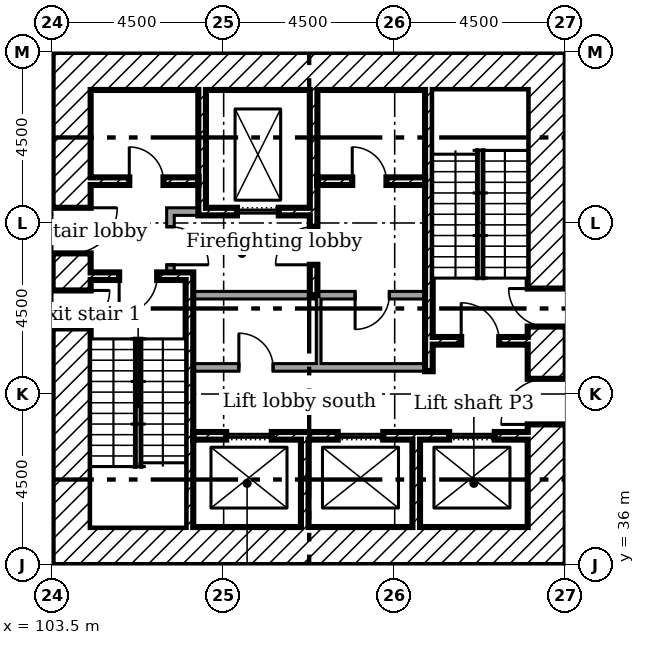
"""IFC4 building model, lengths in metres.
Left out: names, types, materials, properties, quantities, classifications, styles, units other than length and angle.
Written with IfcOpenShell. Run it as: python <this file> out.ifc"""

import sys

from ifc_helpers import new_model, si_unit, direction, frame, frame_2d, origin, place, context, subcontext, project, spatial, rectangle, extrude, element, fill, save


model = new_model("IFC4")
c1 = context("Model", 3, precision=1e-05, world=origin(), true_north=direction((0.0, 1.0)))
c2 = subcontext(c1, "Body", "Model", "MODEL_VIEW")
j1 = project(units=[si_unit("LENGTHUNIT", "METRE"), si_unit("PLANEANGLEUNIT", "RADIAN")], contexts=[c1])
p1 = place(None, origin())
s1 = spatial("IfcSite", under=j1, at=p1, CompositionType="ELEMENT")
p2 = place(p1, origin())
s2 = spatial("IfcBuilding", under=s1, at=p2, CompositionType="ELEMENT")
p3 = place(p2, frame((0.0, 0.0, 16.5)))
s3 = spatial("IfcBuildingStorey", under=s2, at=p3, CompositionType="ELEMENT", Elevation=16.5)
p4 = place(p3, frame((116.5, 36.0, 0.0), z_axis=(0.0, 0.0, 1.0), x_axis=(0.0, 1.0, 0.0)))
e1 = element("IfcWall", 1, at=p4, inside=s3, PredefinedType="SHEAR", context=c2, shape_type="SweptSolid", body=[
    extrude(rectangle(XDim=13.5, YDim=1.0, at=frame_2d((6.75, 0.0))), origin(), (0.0, 0.0, 1.0), 4.0),
])
p5 = place(p4, frame((3.7, 0.0, 0.0)))
e2 = element("IfcOpeningElement", 2, at=p5, cuts=e1, PredefinedType="OPENING", context=c2, shape_type="SweptSolid", body=[
    extrude(rectangle(XDim=1.2, YDim=2.1, at=frame_2d((0.6, 1.05))), frame((0.0, 0.51, 0.0), z_axis=(0.0, -1.0, 0.0), x_axis=(1.0, 0.0, 0.0)), (0.0, 0.0, 1.0), 1.02),
])
p6 = place(p4, frame((6.275, 0.0, 0.0)))
e3 = element("IfcOpeningElement", 3, at=p6, cuts=e1, PredefinedType="OPENING", context=c2, shape_type="SweptSolid", body=[
    extrude(rectangle(XDim=1.0, YDim=2.1, at=frame_2d((0.5, 1.05))), frame((0.0, 0.51, 0.0), z_axis=(0.0, -1.0, 0.0), x_axis=(1.0, 0.0, 0.0)), (0.0, 0.0, 1.0), 1.02),
])
for number, where in (
    (4, (104.5, 49.0, 0.0)),
    (5, (104.5, 36.5, 0.0)),
):
    element("IfcWall", number, at=place(p3, frame(where)), inside=s3, PredefinedType="SHEAR", context=c2, shape_type="SweptSolid", body=[
        extrude(rectangle(XDim=11.5, YDim=1.0, at=frame_2d((5.75, 0.0))), origin(), (0.0, 0.0, 1.0), 4.0),
    ])
p7 = place(p3, frame((104.0, 36.0, 0.0), z_axis=(0.0, 0.0, 1.0), x_axis=(0.0, 1.0, 0.0)))
e6 = element("IfcWall", 6, at=p7, inside=s3, PredefinedType="SHEAR", context=c2, shape_type="SweptSolid", body=[
    extrude(rectangle(XDim=13.5, YDim=1.0, at=frame_2d((6.75, 0.0))), origin(), (0.0, 0.0, 1.0), 4.0),
])
p8 = place(p7, frame((8.2, 0.0, 0.0)))
e7 = element("IfcOpeningElement", 7, at=p8, cuts=e6, PredefinedType="OPENING", context=c2, shape_type="SweptSolid", body=[
    extrude(rectangle(XDim=1.2, YDim=2.1, at=frame_2d((0.6, 1.05))), frame((0.0, 0.51, 0.0), z_axis=(0.0, -1.0, 0.0), x_axis=(1.0, 0.0, 0.0)), (0.0, 0.0, 1.0), 1.02),
])
p9 = place(p7, frame((6.225, 0.0, 0.0)))
e8 = element("IfcOpeningElement", 8, at=p9, cuts=e6, PredefinedType="OPENING", context=c2, shape_type="SweptSolid", body=[
    extrude(rectangle(XDim=1.0, YDim=2.1, at=frame_2d((0.5, 1.05))), frame((0.0, 0.51, 0.0), z_axis=(0.0, -1.0, 0.0), x_axis=(1.0, 0.0, 0.0)), (0.0, 0.0, 1.0), 1.02),
])
p10 = place(p3, frame((107.433, 48.5, 0.0), z_axis=(0.0, 0.0, 1.0), x_axis=(0.0, -1.0, 0.0)))
e9 = element("IfcWall", 9, at=p10, inside=s3, PredefinedType="SHEAR", context=c2, shape_type="SweptSolid", body=[
    extrude(rectangle(XDim=3.3, YDim=0.2, at=frame_2d((1.65, 0.0))), origin(), (0.0, 0.0, 1.0), 4.0),
])
p11 = place(p3, frame((110.367, 48.5, 0.0), z_axis=(0.0, 0.0, 1.0), x_axis=(0.0, -1.0, 0.0)))
e10 = element("IfcWall", 10, at=p11, inside=s3, PredefinedType="SHEAR", context=c2, shape_type="SweptSolid", body=[
    extrude(rectangle(XDim=5.4, YDim=0.2, at=frame_2d((2.7, 0.0))), origin(), (0.0, 0.0, 1.0), 4.0),
])
p12 = place(p11, frame((3.6, 0.0, 0.0)))
e11 = element("IfcOpeningElement", 11, at=p12, cuts=e10, PredefinedType="OPENING", context=c2, shape_type="SweptSolid", body=[
    extrude(rectangle(XDim=1.0, YDim=2.1, at=frame_2d((0.5, 1.05))), frame((0.0, 0.11, 0.0), z_axis=(0.0, -1.0, 0.0), x_axis=(1.0, 0.0, 0.0)), (0.0, 0.0, 1.0), 0.22),
])
for number, where, z_axis, x_axis in (
    (12, (110.133, 37.0, 0.0), (0.0, 0.0, 1.0), (0.0, 1.0, 0.0)),
    (13, (113.067, 37.0, 0.0), (0.0, 0.0, 1.0), (0.0, 1.0, 0.0)),
):
    element("IfcWall", number, at=place(p3, frame(where, z_axis=z_axis, x_axis=x_axis)), inside=s3, PredefinedType="SHEAR", context=c2, shape_type="SweptSolid", body=[
        extrude(rectangle(XDim=2.3, YDim=0.2, at=frame_2d((1.15, 0.0))), origin(), (0.0, 0.0, 1.0), 4.0),
    ])
p13 = place(p3, frame((106.5, 45.3, 0.0)))
e14 = element("IfcWall", 14, at=p13, inside=s3, PredefinedType="PARTITIONING", context=c2, shape_type="SweptSolid", body=[
    extrude(rectangle(XDim=0.833, YDim=0.2, at=frame_2d((0.417, 0.0))), origin(), (0.0, 0.0, 1.0), 4.0),
])
p14 = place(p3, frame((106.6, 43.7, 0.0), z_axis=(0.0, 0.0, 1.0), x_axis=(0.0, 1.0, 0.0)))
e15 = element("IfcWall", 15, at=p14, inside=s3, PredefinedType="PARTITIONING", context=c2, shape_type="SweptSolid", body=[
    extrude(rectangle(XDim=1.5, YDim=0.2, at=frame_2d((0.75, 0.0))), origin(), (0.0, 0.0, 1.0), 4.0),
])
p15 = place(p14, frame((0.2, 0.0, 0.0)))
e16 = element("IfcOpeningElement", 16, at=p15, cuts=e15, PredefinedType="OPENING", context=c2, shape_type="SweptSolid", body=[
    extrude(rectangle(XDim=1.0, YDim=2.1, at=frame_2d((0.5, 1.05))), frame((0.0, 0.11, 0.0), z_axis=(0.0, -1.0, 0.0), x_axis=(1.0, 0.0, 0.0)), (0.0, 0.0, 1.0), 0.22),
])
p16 = place(p3, frame((104.5, 46.1, 0.0)))
e17 = element("IfcWall", 17, at=p16, inside=s3, PredefinedType="SHEAR", context=c2, shape_type="SweptSolid", body=[
    extrude(rectangle(XDim=2.833, YDim=0.2, at=frame_2d((1.417, 0.0))), origin(), (0.0, 0.0, 1.0), 4.0),
])
p17 = place(p16, frame((1.017, 0.0, 0.0)))
e18 = element("IfcOpeningElement", 18, at=p17, cuts=e17, PredefinedType="OPENING", context=c2, shape_type="SweptSolid", body=[
    extrude(rectangle(XDim=0.9, YDim=2.1, at=frame_2d((0.45, 1.05))), frame((0.0, 0.11, 0.0), z_axis=(0.0, -1.0, 0.0), x_axis=(1.0, 0.0, 0.0)), (0.0, 0.0, 1.0), 0.22),
])
p18 = place(p3, frame((110.467, 46.1, 0.0)))
e19 = element("IfcWall", 19, at=p18, inside=s3, PredefinedType="SHEAR", context=c2, shape_type="SweptSolid", body=[
    extrude(rectangle(XDim=2.833, YDim=0.2, at=frame_2d((1.417, 0.0))), origin(), (0.0, 0.0, 1.0), 4.0),
])
p19 = place(p18, frame((0.917, 0.0, 0.0)))
e20 = element("IfcOpeningElement", 20, at=p19, cuts=e19, PredefinedType="OPENING", context=c2, shape_type="SweptSolid", body=[
    extrude(rectangle(XDim=0.9, YDim=2.1, at=frame_2d((0.45, 1.05))), frame((0.0, 0.11, 0.0), z_axis=(0.0, -1.0, 0.0), x_axis=(1.0, 0.0, 0.0)), (0.0, 0.0, 1.0), 0.22),
])
p20 = place(p3, frame((107.533, 45.3, 0.0)))
e21 = element("IfcWall", 21, at=p20, inside=s3, PredefinedType="SHEAR", context=c2, shape_type="SweptSolid", body=[
    extrude(rectangle(XDim=2.733, YDim=0.2, at=frame_2d((1.367, 0.0))), origin(), (0.0, 0.0, 1.0), 4.0),
])
p21 = place(p20, frame((0.817, 0.0, 0.0)))
e22 = element("IfcOpeningElement", 22, at=p21, cuts=e21, PredefinedType="OPENING", context=c2, shape_type="SweptSolid", body=[
    extrude(rectangle(XDim=1.1, YDim=2.1, at=frame_2d((0.55, 1.05))), frame((0.0, 0.11, 0.0), z_axis=(0.0, -1.0, 0.0), x_axis=(1.0, 0.0, 0.0)), (0.0, 0.0, 1.0), 0.22),
])
p22 = place(p3, frame((107.2, 39.4, 0.0)))
e23 = element("IfcWall", 23, at=p22, inside=s3, PredefinedType="SHEAR", context=c2, shape_type="SweptSolid", body=[
    extrude(rectangle(XDim=8.8, YDim=0.2, at=frame_2d((4.4, 0.0))), origin(), (0.0, 0.0, 1.0), 4.0),
])
p23 = place(p22, frame((0.867, 0.0, 0.0)))
e24 = element("IfcOpeningElement", 24, at=p23, cuts=e23, PredefinedType="OPENING", context=c2, shape_type="SweptSolid", body=[
    extrude(rectangle(XDim=1.2, YDim=2.1, at=frame_2d((0.6, 1.05))), frame((0.0, 0.11, 0.0), z_axis=(0.0, -1.0, 0.0), x_axis=(1.0, 0.0, 0.0)), (0.0, 0.0, 1.0), 0.22),
])
p24 = place(p22, frame((3.8, 0.0, 0.0)))
e25 = element("IfcOpeningElement", 25, at=p24, cuts=e23, PredefinedType="OPENING", context=c2, shape_type="SweptSolid", body=[
    extrude(rectangle(XDim=1.2, YDim=2.1, at=frame_2d((0.6, 1.05))), frame((0.0, 0.11, 0.0), z_axis=(0.0, -1.0, 0.0), x_axis=(1.0, 0.0, 0.0)), (0.0, 0.0, 1.0), 0.22),
])
p25 = place(p22, frame((6.733, 0.0, 0.0)))
e26 = element("IfcOpeningElement", 26, at=p25, cuts=e23, PredefinedType="OPENING", context=c2, shape_type="SweptSolid", body=[
    extrude(rectangle(XDim=1.2, YDim=2.1, at=frame_2d((0.6, 1.05))), frame((0.0, 0.11, 0.0), z_axis=(0.0, -1.0, 0.0), x_axis=(1.0, 0.0, 0.0)), (0.0, 0.0, 1.0), 0.22),
])
p26 = place(p3, frame((107.1, 37.0, 0.0), z_axis=(0.0, 0.0, 1.0), x_axis=(0.0, 1.0, 0.0)))
e27 = element("IfcWall", 27, at=p26, inside=s3, PredefinedType="SHEAR", context=c2, shape_type="SweptSolid", body=[
    extrude(rectangle(XDim=6.7, YDim=0.2, at=frame_2d((3.35, 0.0))), origin(), (0.0, 0.0, 1.0), 4.0),
])
p27 = place(p3, frame((104.5, 43.6, 0.0)))
e28 = element("IfcWall", 28, at=p27, inside=s3, PredefinedType="SHEAR", context=c2, shape_type="SweptSolid", body=[
    extrude(rectangle(XDim=2.5, YDim=0.2, at=frame_2d((1.25, 0.0))), origin(), (0.0, 0.0, 1.0), 4.0),
])
p28 = place(p27, frame((0.75, 0.0, 0.0)))
e29 = element("IfcOpeningElement", 29, at=p28, cuts=e28, PredefinedType="OPENING", context=c2, shape_type="SweptSolid", body=[
    extrude(rectangle(XDim=1.0, YDim=2.1, at=frame_2d((0.5, 1.05))), frame((0.0, 0.11, 0.0), z_axis=(0.0, -1.0, 0.0), x_axis=(1.0, 0.0, 0.0)), (0.0, 0.0, 1.0), 0.22),
])
p29 = place(p3, frame((113.5, 41.9, 0.0)))
e30 = element("IfcWall", 30, at=p29, inside=s3, PredefinedType="SHEAR", context=c2, shape_type="SweptSolid", body=[
    extrude(rectangle(XDim=2.5, YDim=0.2, at=frame_2d((1.25, 0.0))), origin(), (0.0, 0.0, 1.0), 4.0),
])
p30 = place(p29, frame((0.75, 0.0, 0.0)))
e31 = element("IfcOpeningElement", 31, at=p30, cuts=e30, PredefinedType="OPENING", context=c2, shape_type="SweptSolid", body=[
    extrude(rectangle(XDim=1.0, YDim=2.1, at=frame_2d((0.5, 1.05))), frame((0.0, 0.11, 0.0), z_axis=(0.0, -1.0, 0.0), x_axis=(1.0, 0.0, 0.0)), (0.0, 0.0, 1.0), 0.22),
])
p31 = place(p3, frame((113.4, 41.1, 0.0), z_axis=(0.0, 0.0, 1.0), x_axis=(0.0, 1.0, 0.0)))
e32 = element("IfcWall", 32, at=p31, inside=s3, PredefinedType="SHEAR", context=c2, shape_type="SweptSolid", body=[
    extrude(rectangle(XDim=7.4, YDim=0.2, at=frame_2d((3.7, 0.0))), origin(), (0.0, 0.0, 1.0), 4.0),
])
p32 = place(p3, frame((107.2, 43.1, 0.0)))
e33 = element("IfcWall", 33, at=p32, inside=s3, PredefinedType="PARTITIONING", context=c2, shape_type="SweptSolid", body=[
    extrude(rectangle(XDim=6.1, YDim=0.2, at=frame_2d((3.05, 0.0))), origin(), (0.0, 0.0, 1.0), 4.0),
])
p33 = place(p32, frame((4.259, 0.0, 0.0)))
e34 = element("IfcOpeningElement", 34, at=p33, cuts=e33, PredefinedType="OPENING", context=c2, shape_type="SweptSolid", body=[
    extrude(rectangle(XDim=0.9, YDim=2.1, at=frame_2d((0.45, 1.05))), frame((0.0, 0.11, 0.0), z_axis=(0.0, -1.0, 0.0), x_axis=(1.0, 0.0, 0.0)), (0.0, 0.0, 1.0), 0.22),
])
p34 = place(p3, frame((107.2, 41.2, 0.0)))
e35 = element("IfcWall", 35, at=p34, inside=s3, PredefinedType="PARTITIONING", context=c2, shape_type="SweptSolid", body=[
    extrude(rectangle(XDim=6.1, YDim=0.2, at=frame_2d((3.05, 0.0))), origin(), (0.0, 0.0, 1.0), 4.0),
])
p35 = place(p34, frame((1.2, 0.0, 0.0)))
e36 = element("IfcOpeningElement", 36, at=p35, cuts=e35, PredefinedType="OPENING", context=c2, shape_type="SweptSolid", body=[
    extrude(rectangle(XDim=0.9, YDim=2.1, at=frame_2d((0.45, 1.05))), frame((0.0, 0.11, 0.0), z_axis=(0.0, -1.0, 0.0), x_axis=(1.0, 0.0, 0.0)), (0.0, 0.0, 1.0), 0.22),
])
p36 = place(p3, frame((110.5, 41.3, 0.0), z_axis=(0.0, 0.0, 1.0), x_axis=(0.0, 1.0, 0.0)))
e37 = element("IfcWall", 37, at=p36, inside=s3, PredefinedType="PARTITIONING", context=c2, shape_type="SweptSolid", body=[
    extrude(rectangle(XDim=1.7, YDim=0.125, at=frame_2d((0.85, 0.0))), origin(), (0.0, 0.0, 1.0), 4.0),
])
p37 = place(p8, frame((1.2, 0.0, 0.0), x_axis=(-1.0, 0.0, 0.0)))
e38 = element("IfcDoor", 38, at=p37, inside=s3, OperationType="SINGLE_SWING_RIGHT", PredefinedType="DOOR", context=c2, shape_type="SweptSolid", body=[
    extrude(rectangle(XDim=1.2, YDim=2.1, at=frame_2d((0.6, 1.05))), frame((0.0, 0.025, 0.0), z_axis=(0.0, -1.0, 0.0), x_axis=(1.0, 0.0, 0.0)), (0.0, 0.0, 1.0), 0.05),
])
fill(e7, e38)
p38 = place(p5, origin())
e39 = element("IfcDoor", 39, at=p38, inside=s3, OperationType="SINGLE_SWING_RIGHT", PredefinedType="DOOR", context=c2, shape_type="SweptSolid", body=[
    extrude(rectangle(XDim=1.2, YDim=2.1, at=frame_2d((0.6, 1.05))), frame((0.0, 0.025, 0.0), z_axis=(0.0, -1.0, 0.0), x_axis=(1.0, 0.0, 0.0)), (0.0, 0.0, 1.0), 0.05),
])
fill(e2, e39)
p39 = place(p28, frame((1.0, 0.0, 0.0), x_axis=(-1.0, 0.0, 0.0)))
e40 = element("IfcDoor", 40, at=p39, inside=s3, OperationType="SINGLE_SWING_LEFT", PredefinedType="DOOR", context=c2, shape_type="SweptSolid", body=[
    extrude(rectangle(XDim=1.0, YDim=2.1, at=frame_2d((0.5, 1.05))), frame((0.0, 0.025, 0.0), z_axis=(0.0, -1.0, 0.0), x_axis=(1.0, 0.0, 0.0)), (0.0, 0.0, 1.0), 0.05),
])
fill(e29, e40)
p40 = place(p9, frame((1.0, 0.0, 0.0), x_axis=(-1.0, 0.0, 0.0)))
e41 = element("IfcDoor", 41, at=p40, inside=s3, OperationType="SINGLE_SWING_RIGHT", PredefinedType="DOOR", context=c2, shape_type="SweptSolid", body=[
    extrude(rectangle(XDim=1.0, YDim=2.1, at=frame_2d((0.5, 1.05))), frame((0.0, 0.025, 0.0), z_axis=(0.0, -1.0, 0.0), x_axis=(1.0, 0.0, 0.0)), (0.0, 0.0, 1.0), 0.05),
])
fill(e8, e41)
p41 = place(p30, origin())
e42 = element("IfcDoor", 42, at=p41, inside=s3, OperationType="SINGLE_SWING_RIGHT", PredefinedType="DOOR", context=c2, shape_type="SweptSolid", body=[
    extrude(rectangle(XDim=1.0, YDim=2.1, at=frame_2d((0.5, 1.05))), frame((0.0, 0.025, 0.0), z_axis=(0.0, -1.0, 0.0), x_axis=(1.0, 0.0, 0.0)), (0.0, 0.0, 1.0), 0.05),
])
fill(e31, e42)
p42 = place(p6, origin())
e43 = element("IfcDoor", 43, at=p42, inside=s3, OperationType="SINGLE_SWING_LEFT", PredefinedType="DOOR", context=c2, shape_type="SweptSolid", body=[
    extrude(rectangle(XDim=1.0, YDim=2.1, at=frame_2d((0.5, 1.05))), frame((0.0, 0.025, 0.0), z_axis=(0.0, -1.0, 0.0), x_axis=(1.0, 0.0, 0.0)), (0.0, 0.0, 1.0), 0.05),
])
fill(e3, e43)
p43 = place(p12, frame((1.0, 0.0, 0.0), x_axis=(-1.0, 0.0, 0.0)))
e44 = element("IfcDoor", 44, at=p43, inside=s3, OperationType="SINGLE_SWING_RIGHT", PredefinedType="DOOR", context=c2, shape_type="SweptSolid", body=[
    extrude(rectangle(XDim=1.0, YDim=2.1, at=frame_2d((0.5, 1.05))), frame((0.0, 0.025, 0.0), z_axis=(0.0, -1.0, 0.0), x_axis=(1.0, 0.0, 0.0)), (0.0, 0.0, 1.0), 0.05),
])
fill(e11, e44)
p44 = place(p15, frame((1.0, 0.0, 0.0), x_axis=(-1.0, 0.0, 0.0)))
e45 = element("IfcDoor", 45, at=p44, inside=s3, OperationType="SINGLE_SWING_LEFT", PredefinedType="DOOR", context=c2, shape_type="SweptSolid", body=[
    extrude(rectangle(XDim=1.0, YDim=2.1, at=frame_2d((0.5, 1.05))), frame((0.0, 0.025, 0.0), z_axis=(0.0, -1.0, 0.0), x_axis=(1.0, 0.0, 0.0)), (0.0, 0.0, 1.0), 0.05),
])
fill(e16, e45)
p45 = place(p17, origin())
e46 = element("IfcDoor", 46, at=p45, inside=s3, OperationType="SINGLE_SWING_RIGHT", PredefinedType="DOOR", context=c2, shape_type="SweptSolid", body=[
    extrude(rectangle(XDim=0.9, YDim=2.1, at=frame_2d((0.45, 1.05))), frame((0.0, 0.025, 0.0), z_axis=(0.0, -1.0, 0.0), x_axis=(1.0, 0.0, 0.0)), (0.0, 0.0, 1.0), 0.05),
])
fill(e18, e46)
p46 = place(p19, origin())
e47 = element("IfcDoor", 47, at=p46, inside=s3, OperationType="SINGLE_SWING_RIGHT", PredefinedType="DOOR", context=c2, shape_type="SweptSolid", body=[
    extrude(rectangle(XDim=0.9, YDim=2.1, at=frame_2d((0.45, 1.05))), frame((0.0, 0.025, 0.0), z_axis=(0.0, -1.0, 0.0), x_axis=(1.0, 0.0, 0.0)), (0.0, 0.0, 1.0), 0.05),
])
fill(e20, e47)
p47 = place(p35, origin())
e48 = element("IfcDoor", 48, at=p47, inside=s3, OperationType="SINGLE_SWING_RIGHT", PredefinedType="DOOR", context=c2, shape_type="SweptSolid", body=[
    extrude(rectangle(XDim=0.9, YDim=2.1, at=frame_2d((0.45, 1.05))), frame((0.0, 0.025, 0.0), z_axis=(0.0, -1.0, 0.0), x_axis=(1.0, 0.0, 0.0)), (0.0, 0.0, 1.0), 0.05),
])
fill(e36, e48)
p48 = place(p33, frame((0.9, 0.0, 0.0), x_axis=(-1.0, 0.0, 0.0)))
e49 = element("IfcDoor", 49, at=p48, inside=s3, OperationType="SINGLE_SWING_LEFT", PredefinedType="DOOR", context=c2, shape_type="SweptSolid", body=[
    extrude(rectangle(XDim=0.9, YDim=2.1, at=frame_2d((0.45, 1.05))), frame((0.0, 0.025, 0.0), z_axis=(0.0, -1.0, 0.0), x_axis=(1.0, 0.0, 0.0)), (0.0, 0.0, 1.0), 0.05),
])
fill(e34, e49)
p49 = place(p21, origin())
e50 = element("IfcDoor", 50, at=p49, inside=s3, OperationType="SLIDING_TO_LEFT", PredefinedType="DOOR", context=c2, shape_type="SweptSolid", body=[
    extrude(rectangle(XDim=1.1, YDim=2.1, at=frame_2d((0.55, 1.05))), frame((0.0, 0.025, 0.0), z_axis=(0.0, -1.0, 0.0), x_axis=(1.0, 0.0, 0.0)), (0.0, 0.0, 1.0), 0.05),
])
fill(e22, e50)
p50 = place(p23, origin())
e51 = element("IfcDoor", 51, at=p50, inside=s3, OperationType="SLIDING_TO_LEFT", PredefinedType="DOOR", context=c2, shape_type="SweptSolid", body=[
    extrude(rectangle(XDim=1.2, YDim=2.1, at=frame_2d((0.6, 1.05))), frame((0.0, 0.025, 0.0), z_axis=(0.0, -1.0, 0.0), x_axis=(1.0, 0.0, 0.0)), (0.0, 0.0, 1.0), 0.05),
])
fill(e24, e51)
p51 = place(p24, origin())
e52 = element("IfcDoor", 52, at=p51, inside=s3, OperationType="SLIDING_TO_LEFT", PredefinedType="DOOR", context=c2, shape_type="SweptSolid", body=[
    extrude(rectangle(XDim=1.2, YDim=2.1, at=frame_2d((0.6, 1.05))), frame((0.0, 0.025, 0.0), z_axis=(0.0, -1.0, 0.0), x_axis=(1.0, 0.0, 0.0)), (0.0, 0.0, 1.0), 0.05),
])
fill(e25, e52)
p52 = place(p25, origin())
e53 = element("IfcDoor", 53, at=p52, inside=s3, OperationType="SLIDING_TO_LEFT", PredefinedType="DOOR", context=c2, shape_type="SweptSolid", body=[
    extrude(rectangle(XDim=1.2, YDim=2.1, at=frame_2d((0.6, 1.05))), frame((0.0, 0.025, 0.0), z_axis=(0.0, -1.0, 0.0), x_axis=(1.0, 0.0, 0.0)), (0.0, 0.0, 1.0), 0.05),
])
fill(e26, e53)
save(model, sys.argv[1])
